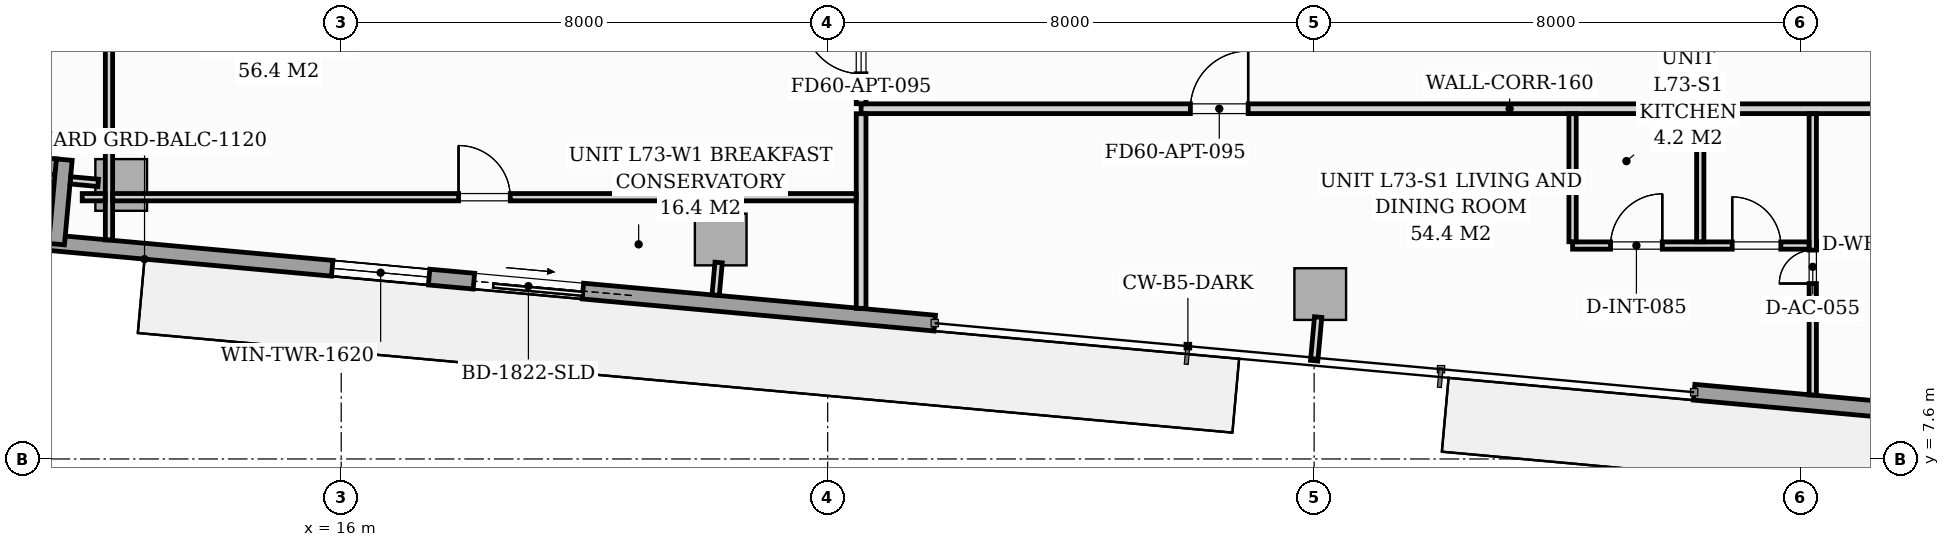
"""IFC4 building model, lengths in metres.
Left out: names, types, materials, properties, quantities, classifications, styles, units other than length and angle.
Written with IfcOpenShell. Run it as: python <this file> out.ifc"""

import sys

from ifc_helpers import new_model, si_unit, direction, frame, frame_2d, origin, origin_2d, place, context, subcontext, project, spatial, rectangle, extrude, source, transform, mapped, element, fill, save


model = new_model("IFC4")
c1 = context("Model", 3, precision=1e-05, world=origin(), true_north=direction((0.0, 1.0)))
c2 = subcontext(c1, "Body", "Model", "MODEL_VIEW")
j1 = project(units=[si_unit("LENGTHUNIT", "METRE"), si_unit("PLANEANGLEUNIT", "RADIAN")], contexts=[c1])
p1 = place(None, origin())
s1 = spatial("IfcSite", under=j1, at=p1, CompositionType="ELEMENT")
p2 = place(p1, origin())
s2 = spatial("IfcBuilding", under=s1, at=p2, CompositionType="ELEMENT")
p3 = place(p2, frame((0.0, 0.0, 252.9)))
s3 = spatial("IfcBuildingStorey", under=s2, at=p3, CompositionType="ELEMENT", Elevation=252.9)
m1 = source(origin(), c2, "Body", "SweptSolid", [
    extrude(rectangle(XDim=0.85, YDim=0.85, at=origin_2d()), origin(), (0.0, 0.0, 1.0), 3.296),
])
for number, where, z_axis, x_axis in (
    (1, (12.382, 12.106, 0.002), (0.0, 0.0, 1.0), (0.996, -0.091, 0.0)),
    (2, (22.241, 11.209, 0.002), (0.0, 0.0, 1.0), (0.996, -0.091, 0.0)),
    (3, (32.1, 10.312, 0.002), (0.0, 0.0, 1.0), (0.996, -0.091, 0.0)),
):
    element("IfcColumn", number, at=place(p3, frame(where, z_axis=z_axis, x_axis=x_axis)), inside=s3, PredefinedType="COLUMN", context=c2, shape_type="MappedRepresentation", body=[
        mapped(m1, transform((0.0, 0.0, 0.0), scale=1.0)),
    ])
p4 = place(p3, frame((11.319, 12.404, 0.0), z_axis=(0.0, 0.0, 1.0), x_axis=(-0.995881721538, 0.090661991521, 0.0)))
e4 = element("IfcWall", 4, at=p4, inside=s3, PredefinedType="STANDARD", context=c2, shape_type="SweptSolid", body=[
    extrude(rectangle(XDim=1.395, YDim=0.26, at=frame_2d((0.698, 0.0))), origin(), (0.0, 0.0, 1.0), 3.04),
])
p5 = place(p3, frame((52.819, 7.372, 0.0), z_axis=(0.0, 0.0, 1.0), x_axis=(-0.995884447498, 0.090632043071, 0.0)))
e5 = element("IfcWall", 5, at=p5, inside=s3, PredefinedType="STANDARD", context=c2, shape_type="SweptSolid", body=[
    extrude(rectangle(XDim=14.63, YDim=0.26, at=frame_2d((7.315, 0.0))), origin(), (0.0, 0.0, 1.0), 3.04),
])
p6 = place(p5, frame((7.549, 0.0, 0.0)))
e6 = element("IfcOpeningElement", 6, at=p6, cuts=e5, PredefinedType="OPENING", context=c2, shape_type="SweptSolid", body=[
    extrude(rectangle(XDim=1.8, YDim=2.06, at=frame_2d((0.9, 1.03))), frame((0.0, 0.14, 0.0), z_axis=(0.0, -1.0, 0.0), x_axis=(1.0, 0.0, 0.0)), (0.0, 0.0, 1.0), 0.28),
])
p7 = place(p5, frame((2.05, 0.0, 0.65)))
e7 = element("IfcOpeningElement", 7, at=p7, cuts=e5, PredefinedType="OPENING", context=c2, shape_type="SweptSolid", body=[
    extrude(rectangle(XDim=1.6, YDim=1.5, at=frame_2d((0.8, 0.75))), frame((0.0, 0.14, 0.0), z_axis=(0.0, -1.0, 0.0), x_axis=(1.0, 0.0, 0.0)), (0.0, 0.0, 1.0), 0.28),
])
p8 = place(p3, frame((25.761, 9.834, 0.0), z_axis=(0.0, 0.0, 1.0), x_axis=(-0.995884584572, 0.090630536861, 0.0)))
e8 = element("IfcWall", 8, at=p8, inside=s3, PredefinedType="STANDARD", context=c2, shape_type="SweptSolid", body=[
    extrude(rectangle(XDim=14.63, YDim=0.26, at=frame_2d((7.315, 0.0))), origin(), (0.0, 0.0, 1.0), 3.04),
])
p9 = place(p8, frame((5.81, 0.0, 0.0)))
e9 = element("IfcOpeningElement", 9, at=p9, cuts=e8, PredefinedType="OPENING", context=c2, shape_type="SweptSolid", body=[
    extrude(rectangle(XDim=1.8, YDim=2.06, at=frame_2d((0.9, 1.03))), frame((0.0, 0.14, 0.0), z_axis=(0.0, -1.0, 0.0), x_axis=(1.0, 0.0, 0.0)), (0.0, 0.0, 1.0), 0.28),
])
p10 = place(p8, frame((8.35, 0.0, 0.65)))
e10 = element("IfcOpeningElement", 10, at=p10, cuts=e8, PredefinedType="OPENING", context=c2, shape_type="SweptSolid", body=[
    extrude(rectangle(XDim=1.6, YDim=1.5, at=frame_2d((0.8, 0.75))), frame((0.0, 0.14, 0.0), z_axis=(0.0, -1.0, 0.0), x_axis=(1.0, 0.0, 0.0)), (0.0, 0.0, 1.0), 0.28),
])
p11 = place(p3, frame((11.319, 11.134, 0.0), z_axis=(0.0, 0.0, 1.0), x_axis=(0.090661991521, 0.995881721538, 0.0)))
e11 = element("IfcWall", 11, at=p11, inside=s3, PredefinedType="STANDARD", context=c2, shape_type="SweptSolid", body=[
    extrude(rectangle(XDim=1.395, YDim=0.26, at=frame_2d((0.698, 0.0))), origin(), (0.0, 0.0, 1.0), 3.04),
])
p12 = place(p3, frame((24.55, 13.36, 0.0), z_axis=(0.0, 0.0, 1.0), x_axis=(1.0, 0.0, 0.0)))
e12 = element("IfcWall", 12, at=p12, inside=s3, PredefinedType="PARTITIONING", context=c2, shape_type="SweptSolid", body=[
    extrude(rectangle(XDim=21.33, YDim=0.16, at=frame_2d((10.665, 0.0))), origin(), (0.0, 0.0, 1.0), 2.605),
])
p13 = place(p12, frame((5.415, 0.0, 0.0)))
e13 = element("IfcOpeningElement", 13, at=p13, cuts=e12, PredefinedType="OPENING", context=c2, shape_type="SweptSolid", body=[
    extrude(rectangle(XDim=0.95, YDim=2.06, at=frame_2d((0.475, 1.03))), frame((0.0, 0.09, 0.0), z_axis=(0.0, -1.0, 0.0), x_axis=(1.0, 0.0, 0.0)), (0.0, 0.0, 1.0), 0.18),
])
p14 = place(p3, frame((24.55, 10.077, 0.0), z_axis=(0.0, 0.0, 1.0), x_axis=(0.0, 1.0, 0.0)))
e14 = element("IfcWall", 14, at=p14, inside=s3, PredefinedType="PARTITIONING", context=c2, shape_type="SweptSolid", body=[
    extrude(rectangle(XDim=3.201, YDim=0.16, at=frame_2d((1.601, 0.0))), origin(), (0.0, 0.0, 1.0), 3.04),
])
p15 = place(p3, frame((24.55, 13.442, 0.0), z_axis=(0.0, 0.0, 1.0), x_axis=(0.0, 1.0, 0.0)))
e15 = element("IfcWall", 15, at=p15, inside=s3, PredefinedType="PARTITIONING", context=c2, shape_type="SweptSolid", body=[
    extrude(rectangle(XDim=7.208, YDim=0.16, at=frame_2d((3.604, 0.0))), origin(), (0.0, 0.0, 1.0), 3.04),
])
p16 = place(p15, frame((0.493, 0.0, 0.0)))
e16 = element("IfcOpeningElement", 16, at=p16, cuts=e15, PredefinedType="OPENING", context=c2, shape_type="SweptSolid", body=[
    extrude(rectangle(XDim=0.95, YDim=2.06, at=frame_2d((0.475, 1.03))), frame((0.0, 0.09, 0.0), z_axis=(0.0, -1.0, 0.0), x_axis=(1.0, 0.0, 0.0)), (0.0, 0.0, 1.0), 0.18),
])
p17 = place(p15, frame((5.949, 0.0, 0.0)))
e17 = element("IfcOpeningElement", 17, at=p17, cuts=e15, PredefinedType="OPENING", context=c2, shape_type="SweptSolid", body=[
    extrude(rectangle(XDim=0.95, YDim=2.06, at=frame_2d((0.475, 1.03))), frame((0.0, 0.09, 0.0), z_axis=(0.0, -1.0, 0.0), x_axis=(1.0, 0.0, 0.0)), (0.0, 0.0, 1.0), 0.18),
])
p18 = place(p3, frame((40.2, 8.653, 0.0), z_axis=(0.0, 0.0, 1.0), x_axis=(0.0, 1.0, 0.0)))
e18 = element("IfcWall", 18, at=p18, inside=s3, PredefinedType="PARTITIONING", context=c2, shape_type="SweptSolid", body=[
    extrude(rectangle(XDim=4.625, YDim=0.12, at=frame_2d((2.312, 0.0))), origin(), (0.0, 0.0, 1.0), 3.04),
])
p19 = place(p18, frame((1.832, 0.0, 0.0)))
e19 = element("IfcOpeningElement", 19, at=p19, cuts=e18, PredefinedType="OPENING", context=c2, shape_type="SweptSolid", body=[
    extrude(rectangle(XDim=0.55, YDim=2.0, at=frame_2d((0.275, 1.0))), frame((0.0, 0.07, 0.0), z_axis=(0.0, -1.0, 0.0), x_axis=(1.0, 0.0, 0.0)), (0.0, 0.0, 1.0), 0.14),
])
p20 = place(p3, frame((36.25, 11.11, 0.0), z_axis=(0.0, 0.0, 1.0), x_axis=(1.0, 0.0, 0.0)))
e20 = element("IfcWall", 20, at=p20, inside=s3, PredefinedType="PARTITIONING", context=c2, shape_type="SweptSolid", body=[
    extrude(rectangle(XDim=3.888, YDim=0.12, at=frame_2d((1.944, 0.0))), origin(), (0.0, 0.0, 1.0), 3.04),
])
p21 = place(p20, frame((0.625, 0.0, 0.0)))
e21 = element("IfcOpeningElement", 21, at=p21, cuts=e20, PredefinedType="OPENING", context=c2, shape_type="SweptSolid", body=[
    extrude(rectangle(XDim=0.85, YDim=2.05, at=frame_2d((0.425, 1.025))), frame((0.0, 0.07, 0.0), z_axis=(0.0, -1.0, 0.0), x_axis=(1.0, 0.0, 0.0)), (0.0, 0.0, 1.0), 0.14),
])
p22 = place(p20, frame((2.625, 0.0, 0.0)))
e22 = element("IfcOpeningElement", 22, at=p22, cuts=e20, PredefinedType="OPENING", context=c2, shape_type="SweptSolid", body=[
    extrude(rectangle(XDim=0.8, YDim=2.02, at=frame_2d((0.4, 1.01))), frame((0.0, 0.07, 0.0), z_axis=(0.0, -1.0, 0.0), x_axis=(1.0, 0.0, 0.0)), (0.0, 0.0, 1.0), 0.14),
])
for number, where, z_axis, x_axis in (
    (23, (38.35, 11.172, 0.0), (0.0, 0.0, 1.0), (0.0, 1.0, 0.0)),
    (24, (36.25, 11.172, 0.0), (0.0, 0.0, 1.0), (0.0, 1.0, 0.0)),
):
    element("IfcWall", number, at=place(p3, frame(where, z_axis=z_axis, x_axis=x_axis)), inside=s3, PredefinedType="PARTITIONING", context=c2, shape_type="SweptSolid", body=[
        extrude(rectangle(XDim=2.106, YDim=0.12, at=frame_2d((1.053, 0.0))), origin(), (0.0, 0.0, 1.0), 3.04),
    ])
p23 = place(p3, frame((40.262, 11.117, 0.0), z_axis=(0.0, 0.0, 1.0), x_axis=(1.0, 0.0, 0.0)))
e25 = element("IfcWall", 25, at=p23, inside=s3, PredefinedType="PARTITIONING", context=c2, shape_type="SweptSolid", body=[
    extrude(rectangle(XDim=5.536, YDim=0.12, at=frame_2d((2.768, 0.0))), origin(), (0.0, 0.0, 1.0), 3.04),
])
p24 = place(p23, frame((2.528, 0.0, 0.0)))
e26 = element("IfcOpeningElement", 26, at=p24, cuts=e25, PredefinedType="OPENING", context=c2, shape_type="SweptSolid", body=[
    extrude(rectangle(XDim=0.8, YDim=2.02, at=frame_2d((0.4, 1.01))), frame((0.0, 0.07, 0.0), z_axis=(0.0, -1.0, 0.0), x_axis=(1.0, 0.0, 0.0)), (0.0, 0.0, 1.0), 0.14),
])
p25 = place(p3, frame((12.181, 11.203, 0.0), z_axis=(0.0, 0.0, 1.0), x_axis=(0.0, 1.0, 0.0)))
e27 = element("IfcWall", 27, at=p25, inside=s3, PredefinedType="PARTITIONING", context=c2, shape_type="SweptSolid", body=[
    extrude(rectangle(XDim=7.945, YDim=0.12, at=frame_2d((3.973, 0.0))), origin(), (0.0, 0.0, 1.0), 2.483),
])
p26 = place(p25, frame((4.059, 0.0, 0.0)))
e28 = element("IfcOpeningElement", 28, at=p26, cuts=e27, PredefinedType="OPENING", context=c2, shape_type="SweptSolid", body=[
    extrude(rectangle(XDim=0.85, YDim=2.05, at=frame_2d((0.425, 1.025))), frame((0.0, 0.07, 0.0), z_axis=(0.0, -1.0, 0.0), x_axis=(1.0, 0.0, 0.0)), (0.0, 0.0, 1.0), 0.14),
])
p27 = place(p3, frame((11.741, 11.905, 0.0), z_axis=(0.0, 0.0, 1.0), x_axis=(1.0, 0.0, 0.0)))
e29 = element("IfcWall", 29, at=p27, inside=s3, PredefinedType="PARTITIONING", context=c2, shape_type="SweptSolid", body=[
    extrude(rectangle(XDim=0.378, YDim=0.12, at=frame_2d((0.189, 0.0))), origin(), (0.0, 0.0, 1.0), 3.04),
])
p28 = place(p3, frame((12.243, 11.905, 0.0), z_axis=(0.0, 0.0, 1.0), x_axis=(1.0, 0.0, 0.0)))
e30 = element("IfcWall", 30, at=p28, inside=s3, PredefinedType="PARTITIONING", context=c2, shape_type="SweptSolid", body=[
    extrude(rectangle(XDim=12.225, YDim=0.12, at=frame_2d((6.113, 0.0))), origin(), (0.0, 0.0, 1.0), 2.483),
])
p29 = place(p28, frame((5.687, 0.0, 0.0)))
e31 = element("IfcOpeningElement", 31, at=p29, cuts=e30, PredefinedType="OPENING", context=c2, shape_type="SweptSolid", body=[
    extrude(rectangle(XDim=0.85, YDim=2.05, at=frame_2d((0.425, 1.025))), frame((0.0, 0.07, 0.0), z_axis=(0.0, -1.0, 0.0), x_axis=(1.0, 0.0, 0.0)), (0.0, 0.0, 1.0), 0.14),
])
p30 = place(p3, frame((12.003, 12.141, 0.0), z_axis=(0.0, 0.0, 1.0), x_axis=(-0.995884462012, 0.090631883588, 0.0)))
e32 = element("IfcWall", 32, at=p30, inside=s3, PredefinedType="PARTITIONING", context=c2, shape_type="SweptSolid", body=[
    extrude(rectangle(XDim=0.458, YDim=0.12, at=frame_2d((0.229, 0.0))), origin(), (0.0, 0.0, 1.0), 3.04),
])
p31 = place(p3, frame((22.207, 10.831, 0.0), z_axis=(0.0, 0.0, 1.0), x_axis=(-0.090781299264, -0.995870852924, 0.0)))
e33 = element("IfcWall", 33, at=p31, inside=s3, PredefinedType="PARTITIONING", context=c2, shape_type="SweptSolid", body=[
    extrude(rectangle(XDim=0.538, YDim=0.12, at=frame_2d((0.269, 0.0))), origin(), (0.0, 0.0, 1.0), 3.04),
])
p32 = place(p3, frame((32.066, 9.933, 0.0), z_axis=(0.0, 0.0, 1.0), x_axis=(-0.090872036342, -0.995862577373, 0.0)))
e34 = element("IfcWall", 34, at=p32, inside=s3, PredefinedType="PARTITIONING", context=c2, shape_type="SweptSolid", body=[
    extrude(rectangle(XDim=0.72, YDim=0.12, at=frame_2d((0.36, 0.0))), origin(), (0.0, 0.0, 1.0), 3.04),
])
m2 = source(origin(), c2, "Body", "SweptSolid", [
    extrude(rectangle(XDim=1.8, YDim=2.06, at=frame_2d((0.9, 1.03))), frame((0.0, 0.025, 0.0), z_axis=(0.0, -1.0, 0.0), x_axis=(1.0, 0.0, 0.0)), (0.0, 0.0, 1.0), 0.05),
])
p33 = place(p9, origin())
e35 = element("IfcDoor", 35, at=p33, inside=s3, OperationType="SLIDING_TO_LEFT", PredefinedType="DOOR", context=c2, shape_type="MappedRepresentation", body=[
    mapped(m2, transform((0.0, 0.0, 0.0), scale=1.0)),
])
fill(e9, e35)
m3 = source(origin(), c2, "Body", "SweptSolid", [
    extrude(rectangle(XDim=1.6, YDim=1.5, at=frame_2d((0.8, 0.75))), frame((0.0, 0.03, 0.0), z_axis=(0.0, -1.0, 0.0), x_axis=(1.0, 0.0, 0.0)), (0.0, 0.0, 1.0), 0.06),
])
p34 = place(p10, origin())
e36 = element("IfcWindow", 36, at=p34, inside=s3, PartitioningType="SINGLE_PANEL", PredefinedType="WINDOW", context=c2, shape_type="MappedRepresentation", body=[
    mapped(m3, transform((0.0, 0.0, 0.0), scale=1.0)),
])
fill(e10, e36)
m4 = source(origin(), c2, "Body", "SweptSolid", [
    extrude(rectangle(XDim=0.95, YDim=2.06, at=frame_2d((0.475, 1.03))), frame((0.0, 0.025, 0.0), z_axis=(0.0, -1.0, 0.0), x_axis=(1.0, 0.0, 0.0)), (0.0, 0.0, 1.0), 0.05),
])
p35 = place(p13, origin())
e37 = element("IfcDoor", 37, at=p35, inside=s3, OperationType="SINGLE_SWING_RIGHT", PredefinedType="DOOR", context=c2, shape_type="MappedRepresentation", body=[
    mapped(m4, transform((0.0, 0.0, 0.0), scale=1.0)),
])
fill(e13, e37)
m5 = source(origin(), c2, "Body", "SweptSolid", [
    extrude(rectangle(XDim=0.55, YDim=2.0, at=frame_2d((0.275, 1.0))), frame((0.0, 0.025, 0.0), z_axis=(0.0, -1.0, 0.0), x_axis=(1.0, 0.0, 0.0)), (0.0, 0.0, 1.0), 0.05),
])
p36 = place(p19, origin())
e38 = element("IfcDoor", 38, at=p36, inside=s3, OperationType="SINGLE_SWING_LEFT", PredefinedType="DOOR", context=c2, shape_type="MappedRepresentation", body=[
    mapped(m5, transform((0.0, 0.0, 0.0), scale=1.0)),
])
fill(e19, e38)
m6 = source(origin(), c2, "Body", "SweptSolid", [
    extrude(rectangle(XDim=0.85, YDim=2.05, at=frame_2d((0.425, 1.025))), frame((0.0, 0.025, 0.0), z_axis=(0.0, -1.0, 0.0), x_axis=(1.0, 0.0, 0.0)), (0.0, 0.0, 1.0), 0.05),
])
p37 = place(p21, origin())
e39 = element("IfcDoor", 39, at=p37, inside=s3, OperationType="SINGLE_SWING_RIGHT", PredefinedType="DOOR", context=c2, shape_type="MappedRepresentation", body=[
    mapped(m6, transform((0.0, 0.0, 0.0), scale=1.0)),
])
fill(e21, e39)
m7 = source(origin(), c2, "Body", "SweptSolid", [
    extrude(rectangle(XDim=0.8, YDim=2.02, at=frame_2d((0.4, 1.01))), frame((0.0, 0.025, 0.0), z_axis=(0.0, -1.0, 0.0), x_axis=(1.0, 0.0, 0.0)), (0.0, 0.0, 1.0), 0.05),
])
p38 = place(p22, origin())
e40 = element("IfcDoor", 40, at=p38, inside=s3, OperationType="SINGLE_SWING_LEFT", PredefinedType="DOOR", context=c2, shape_type="MappedRepresentation", body=[
    mapped(m7, transform((0.0, 0.0, 0.0), scale=1.0)),
])
fill(e22, e40)
p39 = place(p16, origin())
e41 = element("IfcDoor", 41, at=p39, inside=s3, OperationType="SINGLE_SWING_RIGHT", PredefinedType="DOOR", context=c2, shape_type="MappedRepresentation", body=[
    mapped(m4, transform((0.0, 0.0, 0.0), scale=1.0)),
])
fill(e16, e41)
p40 = place(p29, origin())
e42 = element("IfcDoor", 42, at=p40, inside=s3, OperationType="SINGLE_SWING_LEFT", PredefinedType="DOOR", context=c2, shape_type="MappedRepresentation", body=[
    mapped(m6, transform((0.0, 0.0, 0.0), scale=1.0)),
])
fill(e31, e42)
save(model, sys.argv[1])
